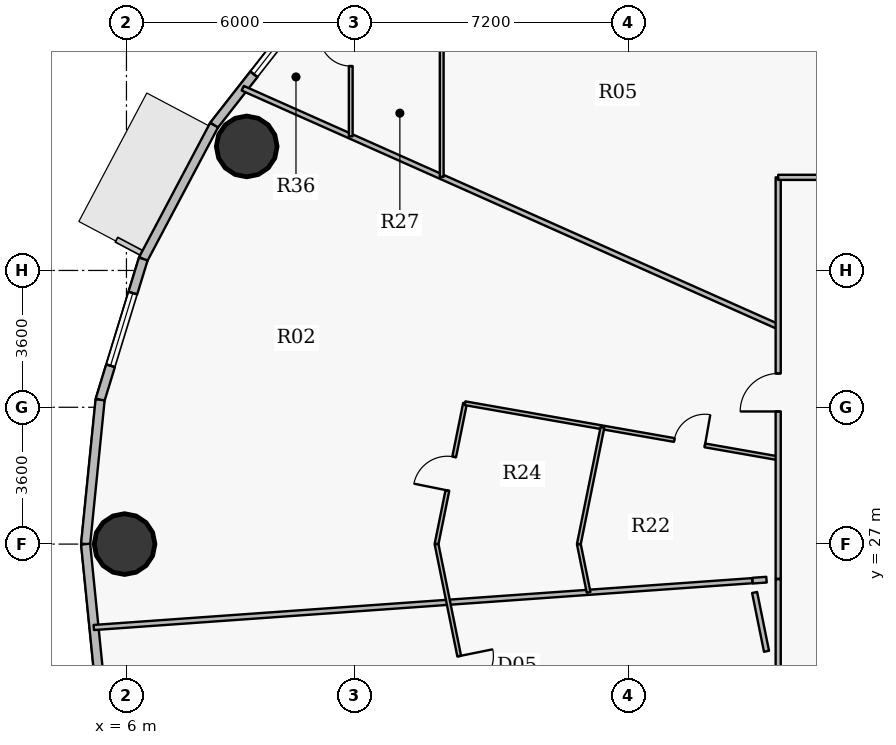
"""IFC4 building model, lengths in metres.
Left out: names, types, materials, properties, quantities, classifications, styles, units other than length and angle.
Written with IfcOpenShell. Run it as: python <this file> out.ifc"""

import sys

from ifc_helpers import new_model, si_unit, direction, frame, frame_2d, origin, origin_2d, place, context, subcontext, project, spatial, rectangle, hollow_circle, extrude, source, transform, mapped, element, fill, save


model = new_model("IFC4")
c1 = context("Model", 3, precision=1e-05, world=origin(), true_north=direction((0.0, 1.0)))
c2 = subcontext(c1, "Body", "Model", "MODEL_VIEW")
j1 = project(units=[si_unit("LENGTHUNIT", "METRE"), si_unit("PLANEANGLEUNIT", "RADIAN")], contexts=[c1])
p1 = place(None, origin())
s1 = spatial("IfcSite", under=j1, at=p1, CompositionType="ELEMENT")
p2 = place(p1, origin())
s2 = spatial("IfcBuilding", under=s1, at=p2, CompositionType="ELEMENT")
p3 = place(p2, frame((0.0, 0.0, 61.8)))
s3 = spatial("IfcBuildingStorey", under=s2, at=p3, CompositionType="ELEMENT", Elevation=61.8)
for number, where, z_axis, x_axis in (
    (1, (9.165, 37.464, 0.0), (0.0, 0.0, 1.0), (1.0, 0.0, 0.0)),
    (2, (5.95, 27.0, 0.0), (0.0, 0.0, 1.0), (1.0, 0.0, 0.0)),
):
    element("IfcColumn", number, at=place(p3, frame(where, z_axis=z_axis, x_axis=x_axis)), inside=s3, PredefinedType="COLUMN", context=c2, shape_type="SweptSolid", body=[
        extrude(hollow_circle(Radius=0.8, WallThickness=0.045, at=origin_2d()), origin(), (0.0, 0.0, 1.0), 4.2),
    ])
p4 = place(p3, frame((8.305, 38.023, 0.0), z_axis=(0.0, 0.0, 1.0), x_axis=(0.616295508253, 0.787514981767, 0.0)))
e3 = element("IfcWall", 3, at=p4, inside=s3, PredefinedType="SOLIDWALL", context=c2, shape_type="SweptSolid", body=[
    extrude(rectangle(XDim=4.129, YDim=0.24, at=frame_2d((2.065, 0.0))), origin(), (0.0, 0.0, 1.0), 3.95),
])
p5 = place(p4, frame((1.701, 0.0, 0.9)))
e4 = element("IfcOpeningElement", 4, at=p5, cuts=e3, PredefinedType="OPENING", context=c2, shape_type="SweptSolid", body=[
    extrude(rectangle(XDim=1.6, YDim=1.75, at=origin_2d()), frame((0.8, 0.13, 0.875), z_axis=(0.0, -1.0, 0.0), x_axis=(1.0, 0.0, 0.0)), (0.0, 0.0, 1.0), 0.26),
])
p6 = place(p3, frame((6.442, 34.501, 0.0), z_axis=(0.0, 0.0, 1.0), x_axis=(0.467662443071, 0.883907144072, 0.0)))
e5 = element("IfcWall", 5, at=p6, inside=s3, PredefinedType="SOLIDWALL", context=c2, shape_type="SweptSolid", body=[
    extrude(rectangle(XDim=3.984, YDim=0.24, at=frame_2d((1.992, 0.0))), origin(), (0.0, 0.0, 1.0), 3.95),
])
p7 = place(p3, frame((5.307, 30.797, 0.0), z_axis=(0.0, 0.0, 1.0), x_axis=(0.293111631758, 0.956078224482, 0.0)))
e6 = element("IfcWall", 6, at=p7, inside=s3, PredefinedType="SOLIDWALL", context=c2, shape_type="SweptSolid", body=[
    extrude(rectangle(XDim=3.875, YDim=0.24, at=frame_2d((1.938, 0.0))), origin(), (0.0, 0.0, 1.0), 3.95),
])
p8 = place(p7, frame((0.938, 0.0, 0.9)))
e7 = element("IfcOpeningElement", 7, at=p8, cuts=e6, PredefinedType="OPENING", context=c2, shape_type="SweptSolid", body=[
    extrude(rectangle(XDim=2.0, YDim=1.75, at=origin_2d()), frame((1.0, 0.13, 0.875), z_axis=(0.0, -1.0, 0.0), x_axis=(1.0, 0.0, 0.0)), (0.0, 0.0, 1.0), 0.26),
])
for number, where, z_axis, x_axis in (
    (8, (4.925, 27.0, 0.0), (0.0, 0.0, 1.0), (0.1, 0.995, 0.0)),
    (9, (5.307, 23.203, 0.0), (0.0, 0.0, 1.0), (-0.1, 0.995, 0.0)),
):
    element("IfcWall", number, at=place(p3, frame(where, z_axis=z_axis, x_axis=x_axis)), inside=s3, PredefinedType="SOLIDWALL", context=c2, shape_type="SweptSolid", body=[
        extrude(rectangle(XDim=3.816, YDim=0.24, at=frame_2d((1.908, 0.0))), origin(), (0.0, 0.0, 1.0), 3.95),
    ])
p9 = place(p3, frame((5.141, 24.805, 0.0), z_axis=(0.0, 0.0, 1.0), x_axis=(0.99748069861, 0.070938395112, 0.0)))
e10 = element("IfcWall", 10, at=p9, inside=s3, PredefinedType="PARTITIONING", context=c2, shape_type="SweptSolid", body=[
    extrude(rectangle(XDim=17.37, YDim=0.135, at=frame_2d((8.685, 0.0))), origin(), (0.0, 0.0, 1.0), 3.335),
])
p10 = place(p3, frame((9.06, 38.995, 0.0), z_axis=(0.0, 0.0, 1.0), x_axis=(0.913545036193, -0.406737589666, 0.0)))
e11 = element("IfcWall", 11, at=p10, inside=s3, PredefinedType="PARTITIONING", context=c2, shape_type="SweptSolid", body=[
    extrude(rectangle(XDim=15.424, YDim=0.135, at=frame_2d((7.712, 0.0))), origin(), (0.0, 0.0, 1.0), 3.335),
])
p11 = place(p3, frame((11.902, 37.729, 0.0), z_axis=(0.0, 0.0, 1.0), x_axis=(0.0, 1.0, 0.0)))
e12 = element("IfcWall", 12, at=p11, inside=s3, PredefinedType="PARTITIONING", context=c2, shape_type="SweptSolid", body=[
    extrude(rectangle(XDim=4.516, YDim=0.1, at=frame_2d((2.258, 0.0))), origin(), (0.0, 0.0, 1.0), 3.335),
])
p12 = place(p11, frame((1.848, 0.0, 0.0)))
e13 = element("IfcOpeningElement", 13, at=p12, cuts=e12, PredefinedType="OPENING", context=c2, shape_type="SweptSolid", body=[
    extrude(rectangle(XDim=0.82, YDim=2.1, at=origin_2d()), frame((0.41, 0.06, 1.05), z_axis=(0.0, -1.0, 0.0), x_axis=(1.0, 0.0, 0.0)), (0.0, 0.0, 1.0), 0.12),
])
p13 = place(p3, frame((14.16, 27.0, 0.0), z_axis=(0.0, 0.0, 1.0), x_axis=(0.198288618329, 0.980143675101, 0.0)))
e14 = element("IfcWall", 14, at=p13, inside=s3, PredefinedType="PARTITIONING", context=c2, shape_type="SweptSolid", body=[
    extrude(rectangle(XDim=3.781, YDim=0.1, at=frame_2d((1.891, 0.0))), origin(), (0.0, 0.0, 1.0), 3.285),
])
p14 = place(p13, frame((1.44, 0.0, 0.0)))
e15 = element("IfcOpeningElement", 15, at=p14, cuts=e14, PredefinedType="OPENING", context=c2, shape_type="SweptSolid", body=[
    extrude(rectangle(XDim=0.9, YDim=2.1, at=origin_2d()), frame((0.45, 0.06, 1.05), z_axis=(0.0, -1.0, 0.0), x_axis=(1.0, 0.0, 0.0)), (0.0, 0.0, 1.0), 0.12),
])
p15 = place(p3, frame((14.16, 27.0, 0.0), z_axis=(0.0, 0.0, 1.0), x_axis=(0.198292702032, -0.980142848936, 0.0)))
e16 = element("IfcWall", 16, at=p15, inside=s3, PredefinedType="PARTITIONING", context=c2, shape_type="SweptSolid", body=[
    extrude(rectangle(XDim=5.392, YDim=0.1, at=frame_2d((2.696, 0.0))), origin(), (0.0, 0.0, 1.0), 3.285),
])
p16 = place(p15, frame((3.007, 0.0, 0.0)))
e17 = element("IfcOpeningElement", 17, at=p16, cuts=e16, PredefinedType="OPENING", context=c2, shape_type="SweptSolid", body=[
    extrude(rectangle(XDim=0.9, YDim=2.1, at=origin_2d()), frame((0.45, 0.06, 1.05), z_axis=(0.0, -1.0, 0.0), x_axis=(1.0, 0.0, 0.0)), (0.0, 0.0, 1.0), 0.12),
])
p17 = place(p3, frame((14.296, 36.663, 0.0), z_axis=(0.0, 0.0, 1.0), x_axis=(0.0, 1.0, 0.0)))
e18 = element("IfcWall", 18, at=p17, inside=s3, PredefinedType="PARTITIONING", context=c2, shape_type="SweptSolid", body=[
    extrude(rectangle(XDim=7.706, YDim=0.1, at=frame_2d((3.853, 0.0))), origin(), (0.0, 0.0, 1.0), 3.335),
])
p18 = place(p17, frame((3.403, 0.0, 0.0)))
e19 = element("IfcOpeningElement", 19, at=p18, cuts=e18, PredefinedType="OPENING", context=c2, shape_type="SweptSolid", body=[
    extrude(rectangle(XDim=0.9, YDim=2.1, at=origin_2d()), frame((0.45, 0.06, 1.05), z_axis=(0.0, -1.0, 0.0), x_axis=(1.0, 0.0, 0.0)), (0.0, 0.0, 1.0), 0.12),
])
p19 = place(p3, frame((14.91, 30.706, 0.0), z_axis=(0.0, 0.0, 1.0), x_axis=(0.984910199579, -0.173066168747, 0.0)))
e20 = element("IfcWall", 20, at=p19, inside=s3, PredefinedType="PARTITIONING", context=c2, shape_type="SweptSolid", body=[
    extrude(rectangle(XDim=8.367, YDim=0.1, at=frame_2d((4.183, 0.0))), origin(), (0.0, 0.0, 1.0), 3.95),
])
p20 = place(p19, frame((5.589, 0.0, 0.0)))
e21 = element("IfcOpeningElement", 21, at=p20, cuts=e20, PredefinedType="OPENING", context=c2, shape_type="SweptSolid", body=[
    extrude(rectangle(XDim=0.82, YDim=2.1, at=origin_2d()), frame((0.41, 0.06, 1.05), z_axis=(0.0, -1.0, 0.0), x_axis=(1.0, 0.0, 0.0)), (0.0, 0.0, 1.0), 0.12),
])
p21 = place(p3, frame((17.904, 27.0, 0.0), z_axis=(0.0, 0.0, 1.0), x_axis=(0.198255955876, -0.980150282334, 0.0)))
e22 = element("IfcWall", 22, at=p21, inside=s3, PredefinedType="PARTITIONING", context=c2, shape_type="SweptSolid", body=[
    extrude(rectangle(XDim=1.294, YDim=0.1, at=frame_2d((0.647, 0.0))), origin(), (0.0, 0.0, 1.0), 3.285),
])
p22 = place(p3, frame((17.904, 27.0, 0.0), z_axis=(0.0, 0.0, 1.0), x_axis=(0.198258794433, 0.980149708172, 0.0)))
e23 = element("IfcWall", 23, at=p22, inside=s3, PredefinedType="PARTITIONING", context=c2, shape_type="SweptSolid", body=[
    extrude(rectangle(XDim=3.133, YDim=0.1, at=frame_2d((1.566, 0.0))), origin(), (0.0, 0.0, 1.0), 3.285),
])
p23 = place(p3, frame((23.15, 26.086, 0.0), z_axis=(0.0, 0.0, 1.0), x_axis=(0.0, 1.0, 0.0)))
e24 = element("IfcWall", 24, at=p23, inside=s3, PredefinedType="PARTITIONING", context=c2, shape_type="SweptSolid", body=[
    extrude(rectangle(XDim=10.564, YDim=0.135, at=frame_2d((5.282, 0.0))), origin(), (0.0, 0.0, 1.0), 3.285),
])
p24 = place(p23, frame((4.403, 0.0, 0.0)))
e25 = element("IfcOpeningElement", 25, at=p24, cuts=e24, PredefinedType="OPENING", context=c2, shape_type="SweptSolid", body=[
    extrude(rectangle(XDim=1.0, YDim=2.15, at=origin_2d()), frame((0.5, 0.078, 1.075), z_axis=(0.0, -1.0, 0.0), x_axis=(1.0, 0.0, 0.0)), (0.0, 0.0, 1.0), 0.155),
])
p25 = place(p3, frame((23.15, 36.65, 0.0), z_axis=(0.0, 0.0, 1.0), x_axis=(1.0, 0.0, 0.0)))
e26 = element("IfcWall", 26, at=p25, inside=s3, PredefinedType="PARTITIONING", context=c2, shape_type="SweptSolid", body=[
    extrude(rectangle(XDim=7.171, YDim=0.135, at=frame_2d((3.586, 0.0))), origin(), (0.0, 0.0, 1.0), 3.285),
])
p26 = place(p25, frame((3.086, 0.0, 0.0)))
e27 = element("IfcOpeningElement", 27, at=p26, cuts=e26, PredefinedType="OPENING", context=c2, shape_type="SweptSolid", body=[
    extrude(rectangle(XDim=1.0, YDim=2.15, at=origin_2d()), frame((0.5, 0.078, 1.075), z_axis=(0.0, -1.0, 0.0), x_axis=(1.0, 0.0, 0.0)), (0.0, 0.0, 1.0), 0.155),
])
p27 = place(p3, frame((23.15, 23.372, 0.0), z_axis=(0.0, 0.0, 1.0), x_axis=(0.0, 1.0, 0.0)))
e28 = element("IfcWall", 28, at=p27, inside=s3, PredefinedType="PARTITIONING", context=c2, shape_type="SweptSolid", body=[
    extrude(rectangle(XDim=2.705, YDim=0.135, at=frame_2d((1.352, 0.0))), origin(), (0.0, 0.0, 1.0), 3.285),
])
p28 = place(p3, frame((22.843, 26.064, 0.0), z_axis=(0.0, 0.0, 1.0), x_axis=(-0.997509116352, -0.070537669335, 0.0)))
e29 = element("IfcWall", 29, at=p28, inside=s3, PredefinedType="PARTITIONING", context=c2, shape_type="SweptSolid", body=[
    extrude(rectangle(XDim=0.367, YDim=0.15, at=frame_2d((0.184, 0.0))), origin(), (0.0, 0.0, 1.0), 3.95),
])
p29 = place(p3, frame((22.53, 25.726, 0.0), z_axis=(0.0, 0.0, 1.0), x_axis=(0.198347121698, -0.980131837721, 0.0)))
e30 = element("IfcWall", 30, at=p29, inside=s3, PredefinedType="PARTITIONING", context=c2, shape_type="SweptSolid", body=[
    extrude(rectangle(XDim=1.578, YDim=0.135, at=frame_2d((0.789, 0.0))), origin(), (0.0, 0.0, 1.0), 3.95),
])
m1 = source(origin(), c2, "Body", "SweptSolid", [
    extrude(rectangle(XDim=1.6, YDim=1.75, at=origin_2d()), frame((0.8, 0.03, 0.875), z_axis=(0.0, -1.0, 0.0), x_axis=(1.0, 0.0, 0.0)), (0.0, 0.0, 1.0), 0.06),
])
p30 = place(p5, origin())
e31 = element("IfcWindow", 31, at=p30, inside=s3, PartitioningType="DOUBLE_PANEL_VERTICAL", PredefinedType="WINDOW", context=c2, shape_type="MappedRepresentation", body=[
    mapped(m1, transform((0.0, 0.0, 0.0), x_axis=(1.0, 0.0, 0.0), y_axis=(0.0, 1.0, 0.0), z_axis=(0.0, 0.0, 1.0), scale=1.0)),
])
fill(e4, e31)
m2 = source(origin(), c2, "Body", "SweptSolid", [
    extrude(rectangle(XDim=2.0, YDim=1.75, at=origin_2d()), frame((1.0, 0.03, 0.875), z_axis=(0.0, -1.0, 0.0), x_axis=(1.0, 0.0, 0.0)), (0.0, 0.0, 1.0), 0.06),
])
p31 = place(p8, origin())
e32 = element("IfcWindow", 32, at=p31, inside=s3, PartitioningType="DOUBLE_PANEL_VERTICAL", PredefinedType="WINDOW", context=c2, shape_type="MappedRepresentation", body=[
    mapped(m2, transform((0.0, 0.0, 0.0), x_axis=(1.0, 0.0, 0.0), y_axis=(0.0, 1.0, 0.0), z_axis=(0.0, 0.0, 1.0), scale=1.0)),
])
fill(e7, e32)
m3 = source(origin(), c2, "Body", "SweptSolid", [
    extrude(rectangle(XDim=0.82, YDim=2.1, at=origin_2d()), frame((0.41, 0.025, 1.05), z_axis=(0.0, -1.0, 0.0), x_axis=(1.0, 0.0, 0.0)), (0.0, 0.0, 1.0), 0.05),
])
p32 = place(p12, origin())
e33 = element("IfcDoor", 33, at=p32, inside=s3, OperationType="SINGLE_SWING_RIGHT", PredefinedType="DOOR", context=c2, shape_type="MappedRepresentation", body=[
    mapped(m3, transform((0.0, 0.0, 0.0), x_axis=(1.0, 0.0, 0.0), y_axis=(0.0, 1.0, 0.0), z_axis=(0.0, 0.0, 1.0), scale=1.0)),
])
fill(e13, e33)
m4 = source(origin(), c2, "Body", "SweptSolid", [
    extrude(rectangle(XDim=1.0, YDim=2.15, at=origin_2d()), frame((0.5, 0.025, 1.075), z_axis=(0.0, -1.0, 0.0), x_axis=(1.0, 0.0, 0.0)), (0.0, 0.0, 1.0), 0.05),
])
p33 = place(p24, origin())
e34 = element("IfcDoor", 34, at=p33, inside=s3, OperationType="SINGLE_SWING_LEFT", PredefinedType="DOOR", context=c2, shape_type="MappedRepresentation", body=[
    mapped(m4, transform((0.0, 0.0, 0.0), x_axis=(1.0, 0.0, 0.0), y_axis=(0.0, 1.0, 0.0), z_axis=(0.0, 0.0, 1.0), scale=1.0)),
])
fill(e25, e34)
p34 = place(p20, origin())
e35 = element("IfcDoor", 35, at=p34, inside=s3, OperationType="SINGLE_SWING_RIGHT", PredefinedType="DOOR", context=c2, shape_type="MappedRepresentation", body=[
    mapped(m3, transform((0.0, 0.0, 0.0), x_axis=(1.0, 0.0, 0.0), y_axis=(0.0, 1.0, 0.0), z_axis=(0.0, 0.0, 1.0), scale=1.0)),
])
fill(e21, e35)
m5 = source(origin(), c2, "Body", "SweptSolid", [
    extrude(rectangle(XDim=0.9, YDim=2.1, at=origin_2d()), frame((0.45, 0.025, 1.05), z_axis=(0.0, -1.0, 0.0), x_axis=(1.0, 0.0, 0.0)), (0.0, 0.0, 1.0), 0.05),
])
p35 = place(p14, origin())
e36 = element("IfcDoor", 36, at=p35, inside=s3, OperationType="SINGLE_SWING_LEFT", PredefinedType="DOOR", context=c2, shape_type="MappedRepresentation", body=[
    mapped(m5, transform((0.0, 0.0, 0.0), x_axis=(1.0, 0.0, 0.0), y_axis=(0.0, 1.0, 0.0), z_axis=(0.0, 0.0, 1.0), scale=1.0)),
])
fill(e15, e36)
p36 = place(p16, origin())
e37 = element("IfcDoor", 37, at=p36, inside=s3, OperationType="SINGLE_SWING_LEFT", PredefinedType="DOOR", context=c2, shape_type="MappedRepresentation", body=[
    mapped(m5, transform((0.0, 0.0, 0.0), x_axis=(1.0, 0.0, 0.0), y_axis=(0.0, 1.0, 0.0), z_axis=(0.0, 0.0, 1.0), scale=1.0)),
])
fill(e17, e37)
save(model, sys.argv[1])
